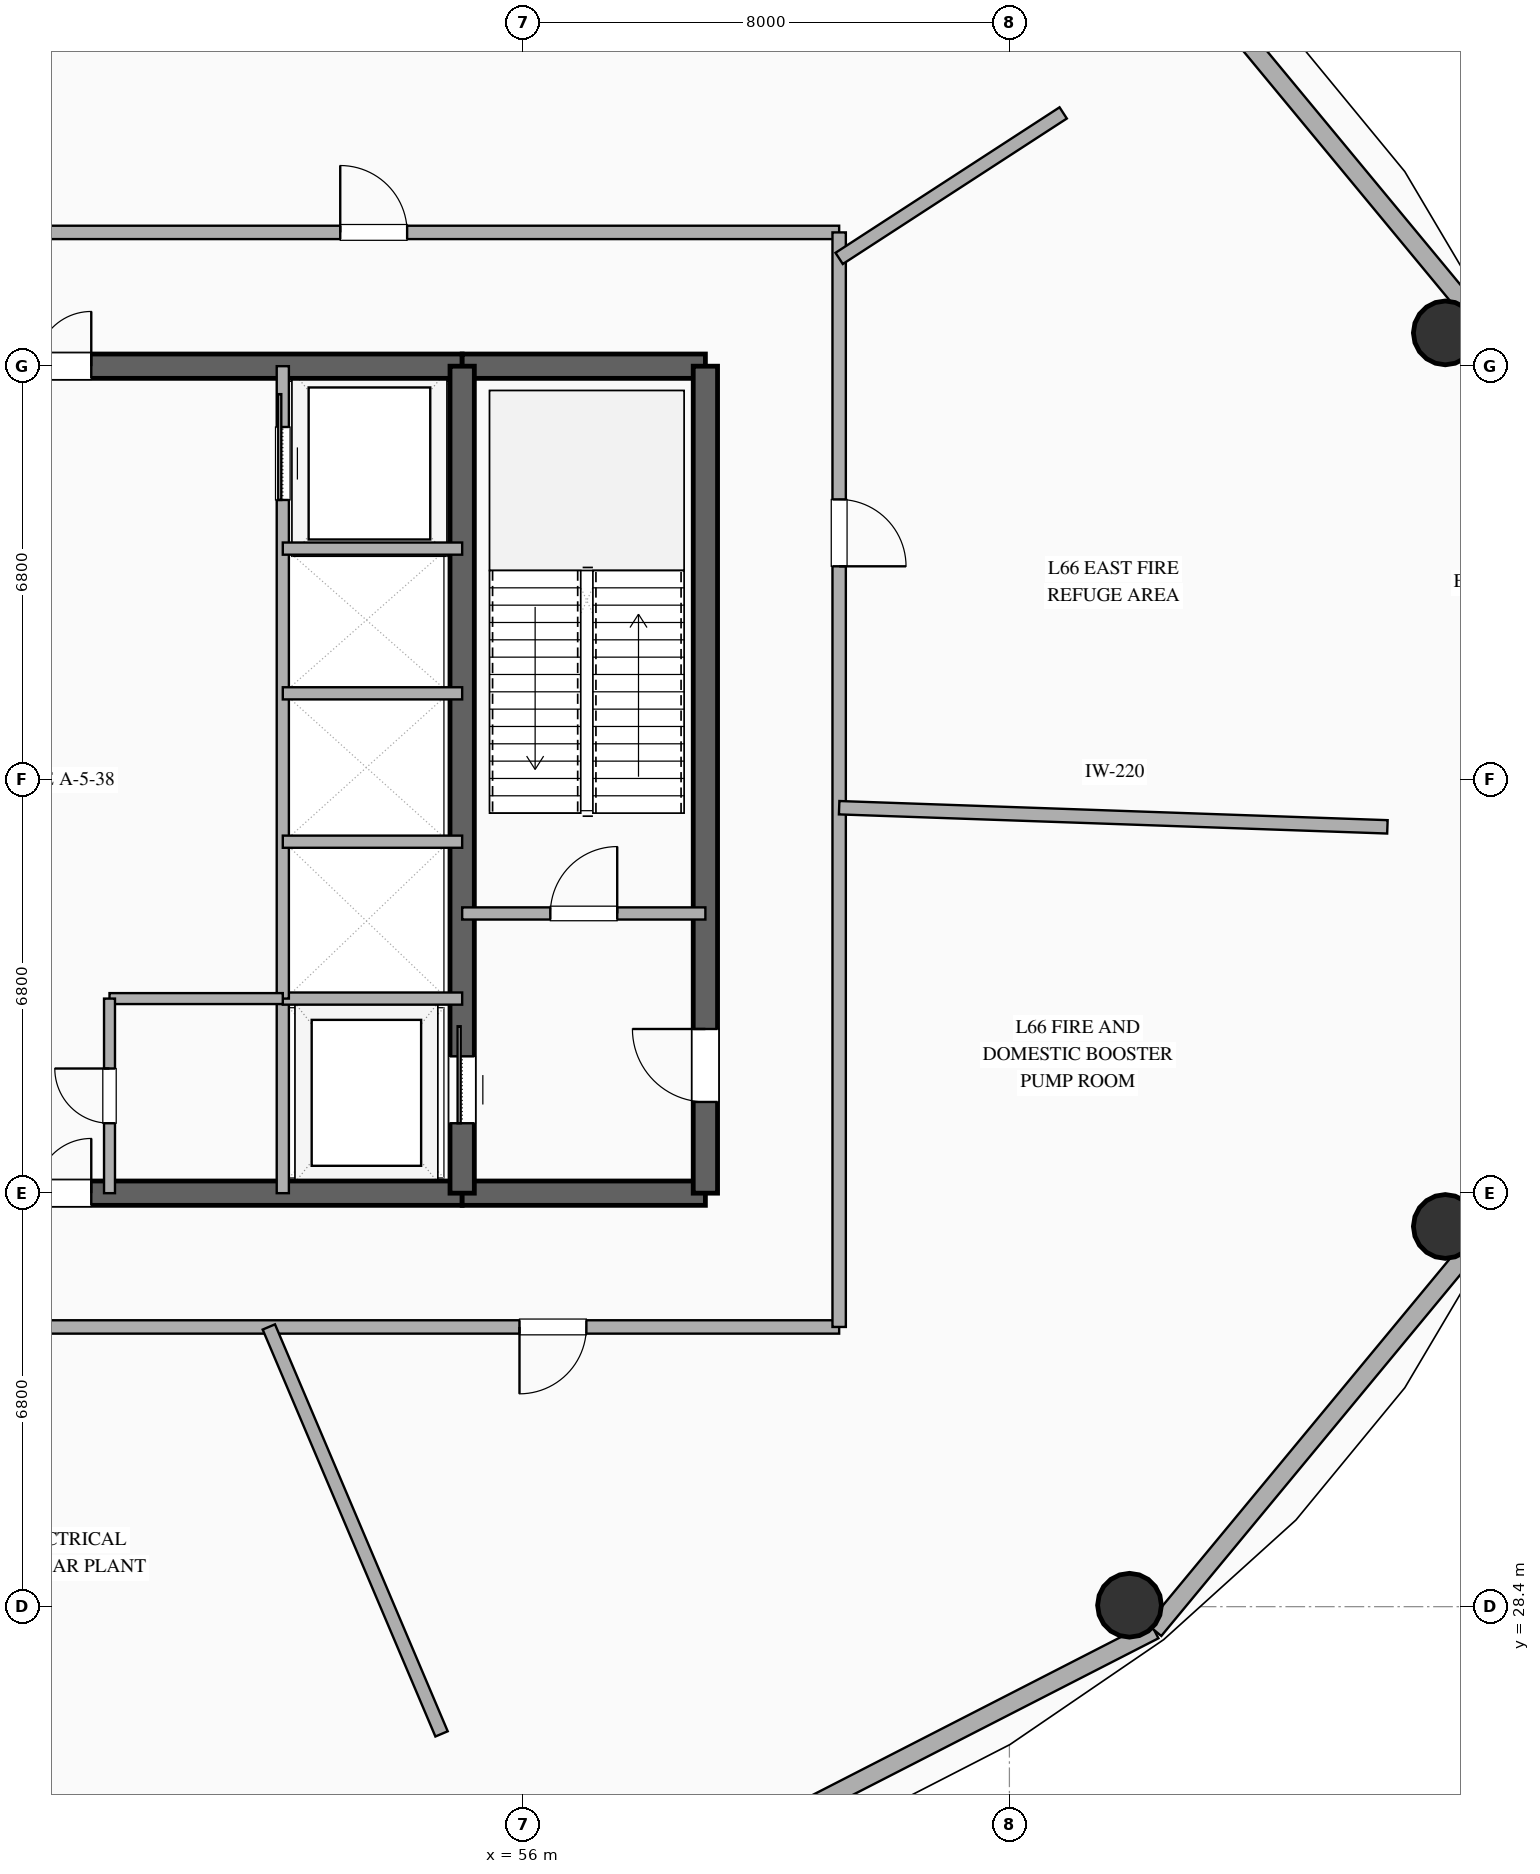
"""IFC4 building model, lengths in metres.
Left out: names, types, materials, properties, quantities, classifications, styles, units other than length and angle.
Written with IfcOpenShell. Run it as: python <this file> out.ifc"""

import sys

from ifc_helpers import new_model, si_unit, direction, frame, frame_2d, origin, origin_2d, place, context, subcontext, project, spatial, rectangle, hollow_circle, extrude, element, fill, save


model = new_model("IFC4")
c1 = context("Model", 3, precision=1e-05, world=origin(), true_north=direction((0.0, 1.0)))
c2 = subcontext(c1, "Body", "Model", "MODEL_VIEW")
j1 = project(units=[si_unit("LENGTHUNIT", "METRE"), si_unit("PLANEANGLEUNIT", "RADIAN")], contexts=[c1])
p1 = place(None, origin())
s1 = spatial("IfcSite", under=j1, at=p1, CompositionType="ELEMENT")
p2 = place(p1, origin())
s2 = spatial("IfcBuilding", under=s1, at=p2, CompositionType="ELEMENT")
p3 = place(p2, frame((0.0, 0.0, 256.8)))
s3 = spatial("IfcBuildingStorey", under=s2, at=p3, CompositionType="ELEMENT", Elevation=256.8)
p4 = place(p3, frame((41.0, 35.2, 0.0), z_axis=(0.0, 0.0, 1.0), x_axis=(1.0, 0.0, 0.0)))
e1 = element("IfcWall", 1, at=p4, inside=s3, PredefinedType="SHEAR", context=c2, shape_type="SweptSolid", body=[
    extrude(rectangle(XDim=14.0, YDim=0.4, at=frame_2d((7.0, 0.0))), origin(), (0.0, 0.0, 1.0), 5.17),
])
p5 = place(p4, frame((6.1, 0.0, 0.0)))
e2 = element("IfcOpeningElement", 2, at=p5, cuts=e1, PredefinedType="OPENING", context=c2, shape_type="SweptSolid", body=[
    extrude(rectangle(XDim=1.8, YDim=2.25, at=frame_2d((0.9, 1.125))), frame((0.0, 0.21, 0.0), z_axis=(0.0, -1.0, 0.0), x_axis=(1.0, 0.0, 0.0)), (0.0, 0.0, 1.0), 0.42),
])
p6 = place(p3, frame((55.0, 35.2, 0.0), z_axis=(0.0, 0.0, 1.0), x_axis=(1.0, 0.0, 0.0)))
e3 = element("IfcWall", 3, at=p6, inside=s3, PredefinedType="SHEAR", context=c2, shape_type="SweptSolid", body=[
    extrude(rectangle(XDim=4.0, YDim=0.4, at=frame_2d((2.0, 0.0))), origin(), (0.0, 0.0, 1.0), 5.17),
])
p7 = place(p3, frame((41.0, 48.8, 0.0), z_axis=(0.0, 0.0, 1.0), x_axis=(1.0, 0.0, 0.0)))
e4 = element("IfcWall", 4, at=p7, inside=s3, PredefinedType="SHEAR", context=c2, shape_type="SweptSolid", body=[
    extrude(rectangle(XDim=14.0, YDim=0.4, at=frame_2d((7.0, 0.0))), origin(), (0.0, 0.0, 1.0), 5.17),
])
p8 = place(p7, frame((6.1, 0.0, 0.0)))
e5 = element("IfcOpeningElement", 5, at=p8, cuts=e4, PredefinedType="OPENING", context=c2, shape_type="SweptSolid", body=[
    extrude(rectangle(XDim=1.8, YDim=2.25, at=frame_2d((0.9, 1.125))), frame((0.0, 0.21, 0.0), z_axis=(0.0, -1.0, 0.0), x_axis=(1.0, 0.0, 0.0)), (0.0, 0.0, 1.0), 0.42),
])
p9 = place(p3, frame((55.0, 48.8, 0.0), z_axis=(0.0, 0.0, 1.0), x_axis=(1.0, 0.0, 0.0)))
e6 = element("IfcWall", 6, at=p9, inside=s3, PredefinedType="SHEAR", context=c2, shape_type="SweptSolid", body=[
    extrude(rectangle(XDim=4.0, YDim=0.4, at=frame_2d((2.0, 0.0))), origin(), (0.0, 0.0, 1.0), 5.17),
])
p10 = place(p3, frame((59.0, 35.2, 0.0), z_axis=(0.0, 0.0, 1.0), x_axis=(0.0, 1.0, 0.0)))
e7 = element("IfcWall", 7, at=p10, inside=s3, PredefinedType="SHEAR", context=c2, shape_type="SweptSolid", body=[
    extrude(rectangle(XDim=13.6, YDim=0.4, at=frame_2d((6.8, 0.0))), origin(), (0.0, 0.0, 1.0), 5.17),
])
p11 = place(p10, frame((1.5, 0.0, 0.0)))
e8 = element("IfcOpeningElement", 8, at=p11, cuts=e7, PredefinedType="OPENING", context=c2, shape_type="SweptSolid", body=[
    extrude(rectangle(XDim=1.2, YDim=2.15, at=frame_2d((0.6, 1.075))), frame((0.0, 0.21, 0.0), z_axis=(0.0, -1.0, 0.0), x_axis=(1.0, 0.0, 0.0)), (0.0, 0.0, 1.0), 0.42),
])
p12 = place(p3, frame((55.0, 35.2, 0.0), z_axis=(0.0, 0.0, 1.0), x_axis=(0.0, 1.0, 0.0)))
e9 = element("IfcWall", 9, at=p12, inside=s3, PredefinedType="SHEAR", context=c2, shape_type="SweptSolid", body=[
    extrude(rectangle(XDim=13.6, YDim=0.4, at=frame_2d((6.8, 0.0))), origin(), (0.0, 0.0, 1.0), 5.17),
])
p13 = place(p12, frame((1.15, 0.0, 0.0)))
e10 = element("IfcOpeningElement", 10, at=p13, cuts=e9, PredefinedType="OPENING", context=c2, shape_type="SweptSolid", body=[
    extrude(rectangle(XDim=1.1, YDim=2.2, at=frame_2d((0.55, 1.1))), frame((0.0, 0.21, 0.0), z_axis=(0.0, -1.0, 0.0), x_axis=(1.0, 0.0, 0.0)), (0.0, 0.0, 1.0), 0.42),
])
for number, where, z_axis, x_axis in (
    (11, (71.169, 49.347, 0.0), (0.0, 0.0, 1.0), (1.0, 0.0, 0.0)),
    (12, (65.975, 28.424, 0.0), (0.0, 0.0, 1.0), (1.0, 0.0, 0.0)),
    (13, (71.169, 34.653, 0.0), (0.0, 0.0, 1.0), (1.0, 0.0, 0.0)),
):
    element("IfcColumn", number, at=place(p3, frame(where, z_axis=z_axis, x_axis=x_axis)), inside=s3, PredefinedType="COLUMN", context=c2, shape_type="SweptSolid", body=[
        extrude(hollow_circle(Radius=0.525, WallThickness=0.028, at=origin_2d()), origin(), (0.0, 0.0, 1.0), 5.17),
    ])
p14 = place(p3, frame((71.694, 49.57, 0.0), z_axis=(0.0, 0.0, 1.0), x_axis=(-0.63761509934, 0.770355103243, 0.0)))
e14 = element("IfcWall", 14, at=p14, inside=s3, PredefinedType="SOLIDWALL", context=c2, shape_type="SweptSolid", body=[
    extrude(rectangle(XDim=8.33, YDim=0.3, at=frame_2d((4.165, 0.0))), origin(), (0.0, 0.0, 1.0), 5.17),
])
p15 = place(p3, frame((58.013, 23.726, 0.0), z_axis=(0.0, 0.0, 1.0), x_axis=(0.890007394051, 0.455946091699, 0.0)))
e15 = element("IfcWall", 15, at=p15, inside=s3, PredefinedType="SOLIDWALL", context=c2, shape_type="SweptSolid", body=[
    extrude(rectangle(XDim=9.404, YDim=0.3, at=frame_2d((4.702, 0.0))), origin(), (0.0, 0.0, 1.0), 5.17),
])
p16 = place(p3, frame((66.383, 28.013, 0.0), z_axis=(0.0, 0.0, 1.0), x_axis=(0.63761509934, 0.770355103243, 0.0)))
e16 = element("IfcWall", 16, at=p16, inside=s3, PredefinedType="SOLIDWALL", context=c2, shape_type="SweptSolid", body=[
    extrude(rectangle(XDim=8.33, YDim=0.3, at=frame_2d((4.165, 0.0))), origin(), (0.0, 0.0, 1.0), 5.17),
])
p17 = place(p3, frame((55.0, 39.8, 0.0), z_axis=(0.0, 0.0, 1.0), x_axis=(1.0, 0.0, 0.0)))
e17 = element("IfcWall", 17, at=p17, inside=s3, PredefinedType="SOLIDWALL", context=c2, shape_type="SweptSolid", body=[
    extrude(rectangle(XDim=4.0, YDim=0.2, at=frame_2d((2.0, 0.0))), origin(), (0.0, 0.0, 1.0), 3.47),
])
p18 = place(p17, frame((1.45, 0.0, 0.0)))
e18 = element("IfcOpeningElement", 18, at=p18, cuts=e17, PredefinedType="OPENING", context=c2, shape_type="SweptSolid", body=[
    extrude(rectangle(XDim=1.1, YDim=2.15, at=frame_2d((0.55, 1.075))), frame((0.0, 0.11, 0.0), z_axis=(0.0, -1.0, 0.0), x_axis=(1.0, 0.0, 0.0)), (0.0, 0.0, 1.0), 0.22),
])
p19 = place(p3, frame((52.05, 35.2, 0.0), z_axis=(0.0, 0.0, 1.0), x_axis=(0.0, 1.0, 0.0)))
e19 = element("IfcWall", 19, at=p19, inside=s3, PredefinedType="SOLIDWALL", context=c2, shape_type="SweptSolid", body=[
    extrude(rectangle(XDim=3.2, YDim=0.2, at=frame_2d((1.6, 0.0))), origin(), (0.0, 0.0, 1.0), 3.47),
])
p20 = place(p3, frame((52.05, 38.4, 0.0), z_axis=(0.0, 0.0, 1.0), x_axis=(1.0, 0.0, 0.0)))
e20 = element("IfcWall", 20, at=p20, inside=s3, PredefinedType="SOLIDWALL", context=c2, shape_type="SweptSolid", body=[
    extrude(rectangle(XDim=2.95, YDim=0.2, at=frame_2d((1.475, 0.0))), origin(), (0.0, 0.0, 1.0), 3.47),
])
p21 = place(p3, frame((52.05, 38.4, 0.0), z_axis=(0.0, 0.0, 1.0), x_axis=(0.0, 1.0, 0.0)))
e21 = element("IfcWall", 21, at=p21, inside=s3, PredefinedType="SOLIDWALL", context=c2, shape_type="SweptSolid", body=[
    extrude(rectangle(XDim=10.4, YDim=0.2, at=frame_2d((5.2, 0.0))), origin(), (0.0, 0.0, 1.0), 3.47),
])
p22 = place(p21, frame((8.2, 0.0, 0.0)))
e22 = element("IfcOpeningElement", 22, at=p22, cuts=e21, PredefinedType="OPENING", context=c2, shape_type="SweptSolid", body=[
    extrude(rectangle(XDim=1.2, YDim=2.2, at=frame_2d((0.6, 1.1))), frame((0.0, 0.11, 0.0), z_axis=(0.0, -1.0, 0.0), x_axis=(1.0, 0.0, 0.0)), (0.0, 0.0, 1.0), 0.22),
])
for number, where, z_axis, x_axis in (
    (23, (52.05, 40.98, 0.0), (0.0, 0.0, 1.0), (1.0, 0.0, 0.0)),
    (24, (52.05, 43.42, 0.0), (0.0, 0.0, 1.0), (1.0, 0.0, 0.0)),
    (25, (52.05, 45.8, 0.0), (0.0, 0.0, 1.0), (1.0, 0.0, 0.0)),
):
    element("IfcWall", number, at=place(p3, frame(where, z_axis=z_axis, x_axis=x_axis)), inside=s3, PredefinedType="SOLIDWALL", context=c2, shape_type="SweptSolid", body=[
        extrude(rectangle(XDim=2.95, YDim=0.2, at=frame_2d((1.475, 0.0))), origin(), (0.0, 0.0, 1.0), 3.47),
    ])
p23 = place(p3, frame((49.2, 38.4, 0.0), z_axis=(0.0, 0.0, 1.0), x_axis=(1.0, 0.0, 0.0)))
e26 = element("IfcWall", 26, at=p23, inside=s3, PredefinedType="PLUMBINGWALL", context=c2, shape_type="SweptSolid", body=[
    extrude(rectangle(XDim=2.85, YDim=0.18, at=frame_2d((1.425, 0.0))), origin(), (0.0, 0.0, 1.0), 3.47),
])
p24 = place(p3, frame((49.2, 35.2, 0.0), z_axis=(0.0, 0.0, 1.0), x_axis=(0.0, 1.0, 0.0)))
e27 = element("IfcWall", 27, at=p24, inside=s3, PredefinedType="PLUMBINGWALL", context=c2, shape_type="SweptSolid", body=[
    extrude(rectangle(XDim=3.2, YDim=0.18, at=frame_2d((1.6, 0.0))), origin(), (0.0, 0.0, 1.0), 3.47),
])
p25 = place(p24, frame((1.15, 0.0, 0.0)))
e28 = element("IfcOpeningElement", 28, at=p25, cuts=e27, PredefinedType="OPENING", context=c2, shape_type="SweptSolid", body=[
    extrude(rectangle(XDim=0.9, YDim=2.1, at=frame_2d((0.45, 1.05))), frame((0.0, 0.1, 0.0), z_axis=(0.0, -1.0, 0.0), x_axis=(1.0, 0.0, 0.0)), (0.0, 0.0, 1.0), 0.2),
])
p26 = place(p3, frame((34.8, 51.0, 0.0), z_axis=(0.0, 0.0, 1.0), x_axis=(1.0, 0.0, 0.0)))
e29 = element("IfcWall", 29, at=p26, inside=s3, PredefinedType="SOLIDWALL", context=c2, shape_type="SweptSolid", body=[
    extrude(rectangle(XDim=26.4, YDim=0.22, at=frame_2d((13.2, 0.0))), origin(), (0.0, 0.0, 1.0), 3.47),
])
p27 = place(p26, frame((18.195, 0.0, 0.0)))
e30 = element("IfcOpeningElement", 30, at=p27, cuts=e29, PredefinedType="OPENING", context=c2, shape_type="SweptSolid", body=[
    extrude(rectangle(XDim=1.1, YDim=2.15, at=frame_2d((0.55, 1.075))), frame((0.0, 0.12, 0.0), z_axis=(0.0, -1.0, 0.0), x_axis=(1.0, 0.0, 0.0)), (0.0, 0.0, 1.0), 0.24),
])
p28 = place(p26, frame((5.011, 0.0, 0.0)))
e31 = element("IfcOpeningElement", 31, at=p28, cuts=e29, PredefinedType="OPENING", context=c2, shape_type="SweptSolid", body=[
    extrude(rectangle(XDim=1.1, YDim=2.15, at=frame_2d((0.55, 1.075))), frame((0.0, 0.12, 0.0), z_axis=(0.0, -1.0, 0.0), x_axis=(1.0, 0.0, 0.0)), (0.0, 0.0, 1.0), 0.24),
])
p29 = place(p3, frame((61.2, 33.0, 0.0), z_axis=(0.0, 0.0, 1.0), x_axis=(-1.0, 0.0, 0.0)))
e32 = element("IfcWall", 32, at=p29, inside=s3, PredefinedType="SOLIDWALL", context=c2, shape_type="SweptSolid", body=[
    extrude(rectangle(XDim=26.4, YDim=0.22, at=frame_2d((13.2, 0.0))), origin(), (0.0, 0.0, 1.0), 3.47),
])
p30 = place(p29, frame((15.572, 0.0, 0.0)))
e33 = element("IfcOpeningElement", 33, at=p30, cuts=e32, PredefinedType="OPENING", context=c2, shape_type="SweptSolid", body=[
    extrude(rectangle(XDim=1.1, YDim=2.15, at=frame_2d((0.55, 1.075))), frame((0.0, 0.12, 0.0), z_axis=(0.0, -1.0, 0.0), x_axis=(1.0, 0.0, 0.0)), (0.0, 0.0, 1.0), 0.24),
])
p31 = place(p29, frame((4.157, 0.0, 0.0)))
e34 = element("IfcOpeningElement", 34, at=p31, cuts=e32, PredefinedType="OPENING", context=c2, shape_type="SweptSolid", body=[
    extrude(rectangle(XDim=1.1, YDim=2.15, at=frame_2d((0.55, 1.075))), frame((0.0, 0.12, 0.0), z_axis=(0.0, -1.0, 0.0), x_axis=(1.0, 0.0, 0.0)), (0.0, 0.0, 1.0), 0.24),
])
p32 = place(p3, frame((61.2, 51.0, 0.0), z_axis=(0.0, 0.0, 1.0), x_axis=(0.0, -1.0, 0.0)))
e35 = element("IfcWall", 35, at=p32, inside=s3, PredefinedType="SOLIDWALL", context=c2, shape_type="SweptSolid", body=[
    extrude(rectangle(XDim=18.0, YDim=0.22, at=frame_2d((9.0, 0.0))), origin(), (0.0, 0.0, 1.0), 3.47),
])
p33 = place(p32, frame((4.391, 0.0, 0.0)))
e36 = element("IfcOpeningElement", 36, at=p33, cuts=e35, PredefinedType="OPENING", context=c2, shape_type="SweptSolid", body=[
    extrude(rectangle(XDim=1.1, YDim=2.15, at=frame_2d((0.55, 1.075))), frame((0.0, 0.12, 0.0), z_axis=(0.0, -1.0, 0.0), x_axis=(1.0, 0.0, 0.0)), (0.0, 0.0, 1.0), 0.24),
])
p34 = place(p3, frame((61.2, 41.539, 0.0), z_axis=(0.0, 0.0, 1.0), x_axis=(0.999390571017, -0.034906826865, 0.0)))
e37 = element("IfcWall", 37, at=p34, inside=s3, PredefinedType="SOLIDWALL", context=c2, shape_type="SweptSolid", body=[
    extrude(rectangle(XDim=9.022, YDim=0.22, at=frame_2d((4.511, 0.0))), origin(), (0.0, 0.0, 1.0), 3.47),
])
p35 = place(p3, frame((54.661, 26.308, 0.0), z_axis=(0.0, 0.0, 1.0), x_axis=(-0.390711106483, 0.920513352033, 0.0)))
e38 = element("IfcWall", 38, at=p35, inside=s3, PredefinedType="SOLIDWALL", context=c2, shape_type="SweptSolid", body=[
    extrude(rectangle(XDim=7.27, YDim=0.22, at=frame_2d((3.635, 0.0))), origin(), (0.0, 0.0, 1.0), 3.47),
])
p36 = place(p3, frame((64.885, 52.965, 0.0), z_axis=(0.0, 0.0, 1.0), x_axis=(-0.83866699899, -0.544644530685, 0.0)))
e39 = element("IfcWall", 39, at=p36, inside=s3, PredefinedType="SOLIDWALL", context=c2, shape_type="SweptSolid", body=[
    extrude(rectangle(XDim=4.393, YDim=0.22, at=frame_2d((2.197, 0.0))), origin(), (0.0, 0.0, 1.0), 3.47),
])
p37 = place(p13, origin())
e40 = element("IfcDoor", 40, at=p37, inside=s3, OperationType="SLIDING_TO_RIGHT", PredefinedType="DOOR", context=c2, shape_type="SweptSolid", body=[
    extrude(rectangle(XDim=1.1, YDim=2.2, at=frame_2d((0.55, 1.1))), frame((0.0, 0.025, 0.0), z_axis=(0.0, -1.0, 0.0), x_axis=(1.0, 0.0, 0.0)), (0.0, 0.0, 1.0), 0.05),
])
fill(e10, e40)
p38 = place(p11, origin())
e41 = element("IfcDoor", 41, at=p38, inside=s3, OperationType="SINGLE_SWING_RIGHT", PredefinedType="DOOR", context=c2, shape_type="SweptSolid", body=[
    extrude(rectangle(XDim=1.2, YDim=2.15, at=frame_2d((0.6, 1.075))), frame((0.0, 0.025, 0.0), z_axis=(0.0, -1.0, 0.0), x_axis=(1.0, 0.0, 0.0)), (0.0, 0.0, 1.0), 0.05),
])
fill(e8, e41)
p39 = place(p5, origin())
e42 = element("IfcDoor", 42, at=p39, inside=s3, OperationType="DOUBLE_DOOR_SINGLE_SWING", PredefinedType="DOOR", context=c2, shape_type="SweptSolid", body=[
    extrude(rectangle(XDim=1.8, YDim=2.25, at=frame_2d((0.9, 1.125))), frame((0.0, 0.025, 0.0), z_axis=(0.0, -1.0, 0.0), x_axis=(1.0, 0.0, 0.0)), (0.0, 0.0, 1.0), 0.05),
])
fill(e2, e42)
p40 = place(p8, origin())
e43 = element("IfcDoor", 43, at=p40, inside=s3, OperationType="DOUBLE_DOOR_SINGLE_SWING", PredefinedType="DOOR", context=c2, shape_type="SweptSolid", body=[
    extrude(rectangle(XDim=1.8, YDim=2.25, at=frame_2d((0.9, 1.125))), frame((0.0, 0.025, 0.0), z_axis=(0.0, -1.0, 0.0), x_axis=(1.0, 0.0, 0.0)), (0.0, 0.0, 1.0), 0.05),
])
fill(e5, e43)
p41 = place(p18, origin())
e44 = element("IfcDoor", 44, at=p41, inside=s3, OperationType="SINGLE_SWING_RIGHT", PredefinedType="DOOR", context=c2, shape_type="SweptSolid", body=[
    extrude(rectangle(XDim=1.1, YDim=2.15, at=frame_2d((0.55, 1.075))), frame((0.0, 0.025, 0.0), z_axis=(0.0, -1.0, 0.0), x_axis=(1.0, 0.0, 0.0)), (0.0, 0.0, 1.0), 0.05),
])
fill(e18, e44)
p42 = place(p22, origin())
e45 = element("IfcDoor", 45, at=p42, inside=s3, OperationType="SLIDING_TO_RIGHT", PredefinedType="DOOR", context=c2, shape_type="SweptSolid", body=[
    extrude(rectangle(XDim=1.2, YDim=2.2, at=frame_2d((0.6, 1.1))), frame((0.0, 0.025, 0.0), z_axis=(0.0, -1.0, 0.0), x_axis=(1.0, 0.0, 0.0)), (0.0, 0.0, 1.0), 0.05),
])
fill(e22, e45)
p43 = place(p25, origin())
e46 = element("IfcDoor", 46, at=p43, inside=s3, OperationType="SINGLE_SWING_RIGHT", PredefinedType="DOOR", context=c2, shape_type="SweptSolid", body=[
    extrude(rectangle(XDim=0.9, YDim=2.1, at=frame_2d((0.45, 1.05))), frame((0.0, 0.025, 0.0), z_axis=(0.0, -1.0, 0.0), x_axis=(1.0, 0.0, 0.0)), (0.0, 0.0, 1.0), 0.05),
])
fill(e28, e46)
p44 = place(p27, origin())
e47 = element("IfcDoor", 47, at=p44, inside=s3, OperationType="SINGLE_SWING_LEFT", PredefinedType="DOOR", context=c2, shape_type="SweptSolid", body=[
    extrude(rectangle(XDim=1.1, YDim=2.15, at=frame_2d((0.55, 1.075))), frame((0.0, 0.025, 0.0), z_axis=(0.0, -1.0, 0.0), x_axis=(1.0, 0.0, 0.0)), (0.0, 0.0, 1.0), 0.05),
])
fill(e30, e47)
p45 = place(p31, origin())
e48 = element("IfcDoor", 48, at=p45, inside=s3, OperationType="SINGLE_SWING_RIGHT", PredefinedType="DOOR", context=c2, shape_type="SweptSolid", body=[
    extrude(rectangle(XDim=1.1, YDim=2.15, at=frame_2d((0.55, 1.075))), frame((0.0, 0.025, 0.0), z_axis=(0.0, -1.0, 0.0), x_axis=(1.0, 0.0, 0.0)), (0.0, 0.0, 1.0), 0.05),
])
fill(e34, e48)
p46 = place(p33, origin())
e49 = element("IfcDoor", 49, at=p46, inside=s3, OperationType="SINGLE_SWING_RIGHT", PredefinedType="DOOR", context=c2, shape_type="SweptSolid", body=[
    extrude(rectangle(XDim=1.1, YDim=2.15, at=frame_2d((0.55, 1.075))), frame((0.0, 0.025, 0.0), z_axis=(0.0, -1.0, 0.0), x_axis=(1.0, 0.0, 0.0)), (0.0, 0.0, 1.0), 0.05),
])
fill(e36, e49)
save(model, sys.argv[1])
